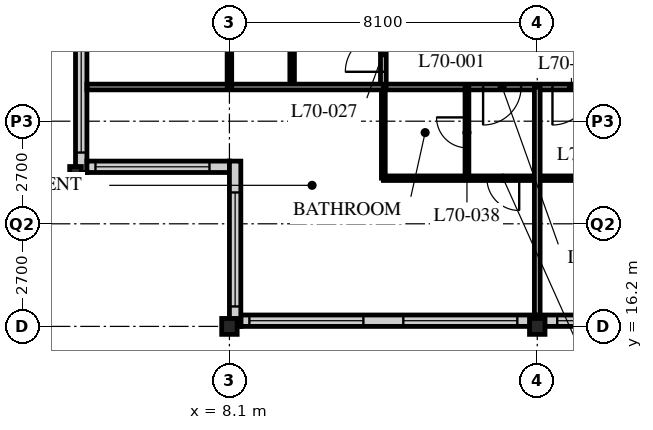
"""IFC4 building model, lengths in metres.
Left out: names, types, materials, properties, quantities, classifications, styles, units other than length and angle.
Written with IfcOpenShell. Run it as: python <this file> out.ifc"""

import sys

from ifc_helpers import new_model, si_unit, direction, frame, frame_2d, origin, origin_2d, place, context, subcontext, project, spatial, rectangle, i_section, extrude, element, fill, save


model = new_model("IFC4")
c1 = context("Model", 3, precision=1e-05, world=origin(), true_north=direction((0.0, 1.0)))
c2 = subcontext(c1, "Body", "Model", "MODEL_VIEW")
j1 = project(units=[si_unit("LENGTHUNIT", "METRE"), si_unit("PLANEANGLEUNIT", "RADIAN")], contexts=[c1])
p1 = place(None, origin())
s1 = spatial("IfcSite", under=j1, at=p1, CompositionType="ELEMENT")
p2 = place(p1, origin())
s2 = spatial("IfcBuilding", under=s1, at=p2, CompositionType="ELEMENT")
p3 = place(p2, frame((0.0, 0.0, 273.6)))
s3 = spatial("IfcBuildingStorey", under=s2, at=p3, CompositionType="ELEMENT", Elevation=273.6)
p4 = place(p3, frame((4.05, 20.25, 0.0), z_axis=(0.0, 0.0, 1.0), x_axis=(1.0, 0.0, 0.0)))
e1 = element("IfcColumn", 1, at=p4, inside=s3, PredefinedType="COLUMN", context=c2, shape_type="SweptSolid", body=[
    extrude(i_section(OverallWidth=0.307, OverallDepth=0.314, WebThickness=0.012, FlangeThickness=0.019, FilletRadius=0.015, at=origin_2d()), origin(), (0.0, 0.0, 1.0), 3.9),
])
for number, where, z_axis, x_axis in (
    (2, (8.1, 16.2, 0.0), (0.0, 0.0, 1.0), (1.0, 0.0, 0.0)),
    (3, (16.2, 16.2, 0.0), (0.0, 0.0, 1.0), (1.0, 0.0, 0.0)),
):
    element("IfcColumn", number, at=place(p3, frame(where, z_axis=z_axis, x_axis=x_axis)), inside=s3, PredefinedType="COLUMN", context=c2, shape_type="SweptSolid", body=[
        extrude(i_section(OverallWidth=0.407, OverallDepth=0.419, WebThickness=0.031, FlangeThickness=0.049, FilletRadius=0.015, at=origin_2d()), origin(), (0.0, 0.0, 1.0), 3.9),
    ])
p5 = place(p3, frame((8.4, 16.35, 0.0), z_axis=(0.0, 0.0, 1.0), x_axis=(1.0, 0.0, 0.0)))
e4 = element("IfcWall", 4, at=p5, inside=s3, PredefinedType="SOLIDWALL", context=c2, shape_type="SweptSolid", body=[
    extrude(rectangle(XDim=40.2, YDim=0.3, at=frame_2d((20.1, 0.0))), origin(), (0.0, 0.0, 1.0), 3.69),
])
p6 = place(p5, frame((0.225, 0.0, 0.6)))
e5 = element("IfcOpeningElement", 5, at=p6, cuts=e4, PredefinedType="OPENING", context=c2, shape_type="SweptSolid", body=[
    extrude(rectangle(XDim=3.0, YDim=2.4, at=frame_2d((1.5, 1.2))), frame((0.0, 0.16, 0.0), z_axis=(0.0, -1.0, 0.0), x_axis=(1.0, 0.0, 0.0)), (0.0, 0.0, 1.0), 0.32),
])
p7 = place(p5, frame((4.275, 0.0, 0.6)))
e6 = element("IfcOpeningElement", 6, at=p7, cuts=e4, PredefinedType="OPENING", context=c2, shape_type="SweptSolid", body=[
    extrude(rectangle(XDim=3.0, YDim=2.4, at=frame_2d((1.5, 1.2))), frame((0.0, 0.16, 0.0), z_axis=(0.0, -1.0, 0.0), x_axis=(1.0, 0.0, 0.0)), (0.0, 0.0, 1.0), 0.32),
])
p8 = place(p5, frame((8.325, 0.0, 0.6)))
e7 = element("IfcOpeningElement", 7, at=p8, cuts=e4, PredefinedType="OPENING", context=c2, shape_type="SweptSolid", body=[
    extrude(rectangle(XDim=3.0, YDim=2.4, at=frame_2d((1.5, 1.2))), frame((0.0, 0.16, 0.0), z_axis=(0.0, -1.0, 0.0), x_axis=(1.0, 0.0, 0.0)), (0.0, 0.0, 1.0), 0.32),
])
p9 = place(p5, frame((12.375, 0.0, 0.6)))
e8 = element("IfcOpeningElement", 8, at=p9, cuts=e4, PredefinedType="OPENING", context=c2, shape_type="SweptSolid", body=[
    extrude(rectangle(XDim=3.0, YDim=2.4, at=frame_2d((1.5, 1.2))), frame((0.0, 0.16, 0.0), z_axis=(0.0, -1.0, 0.0), x_axis=(1.0, 0.0, 0.0)), (0.0, 0.0, 1.0), 0.32),
])
p10 = place(p5, frame((16.425, 0.0, 0.6)))
e9 = element("IfcOpeningElement", 9, at=p10, cuts=e4, PredefinedType="OPENING", context=c2, shape_type="SweptSolid", body=[
    extrude(rectangle(XDim=3.0, YDim=2.4, at=frame_2d((1.5, 1.2))), frame((0.0, 0.16, 0.0), z_axis=(0.0, -1.0, 0.0), x_axis=(1.0, 0.0, 0.0)), (0.0, 0.0, 1.0), 0.32),
])
p11 = place(p5, frame((20.475, 0.0, 0.6)))
e10 = element("IfcOpeningElement", 10, at=p11, cuts=e4, PredefinedType="OPENING", context=c2, shape_type="SweptSolid", body=[
    extrude(rectangle(XDim=3.0, YDim=2.4, at=frame_2d((1.5, 1.2))), frame((0.0, 0.16, 0.0), z_axis=(0.0, -1.0, 0.0), x_axis=(1.0, 0.0, 0.0)), (0.0, 0.0, 1.0), 0.32),
])
p12 = place(p5, frame((24.525, 0.0, 0.6)))
e11 = element("IfcOpeningElement", 11, at=p12, cuts=e4, PredefinedType="OPENING", context=c2, shape_type="SweptSolid", body=[
    extrude(rectangle(XDim=3.0, YDim=2.4, at=frame_2d((1.5, 1.2))), frame((0.0, 0.16, 0.0), z_axis=(0.0, -1.0, 0.0), x_axis=(1.0, 0.0, 0.0)), (0.0, 0.0, 1.0), 0.32),
])
p13 = place(p5, frame((28.575, 0.0, 0.6)))
e12 = element("IfcOpeningElement", 12, at=p13, cuts=e4, PredefinedType="OPENING", context=c2, shape_type="SweptSolid", body=[
    extrude(rectangle(XDim=3.0, YDim=2.4, at=frame_2d((1.5, 1.2))), frame((0.0, 0.16, 0.0), z_axis=(0.0, -1.0, 0.0), x_axis=(1.0, 0.0, 0.0)), (0.0, 0.0, 1.0), 0.32),
])
p14 = place(p5, frame((32.625, 0.0, 0.6)))
e13 = element("IfcOpeningElement", 13, at=p14, cuts=e4, PredefinedType="OPENING", context=c2, shape_type="SweptSolid", body=[
    extrude(rectangle(XDim=3.0, YDim=2.4, at=frame_2d((1.5, 1.2))), frame((0.0, 0.16, 0.0), z_axis=(0.0, -1.0, 0.0), x_axis=(1.0, 0.0, 0.0)), (0.0, 0.0, 1.0), 0.32),
])
p15 = place(p5, frame((36.675, 0.0, 0.6)))
e14 = element("IfcOpeningElement", 14, at=p15, cuts=e4, PredefinedType="OPENING", context=c2, shape_type="SweptSolid", body=[
    extrude(rectangle(XDim=3.0, YDim=2.4, at=frame_2d((1.5, 1.2))), frame((0.0, 0.16, 0.0), z_axis=(0.0, -1.0, 0.0), x_axis=(1.0, 0.0, 0.0)), (0.0, 0.0, 1.0), 0.32),
])
p16 = place(p3, frame((4.2, 24.6, 0.0), z_axis=(0.0, 0.0, 1.0), x_axis=(0.0, -1.0, 0.0)))
e15 = element("IfcWall", 15, at=p16, inside=s3, PredefinedType="SOLIDWALL", context=c2, shape_type="SweptSolid", body=[
    extrude(rectangle(XDim=4.35, YDim=0.3, at=frame_2d((2.175, 0.0))), origin(), (0.0, 0.0, 1.0), 3.69),
])
p17 = place(p16, frame((0.825, 0.0, 0.6)))
e16 = element("IfcOpeningElement", 16, at=p17, cuts=e15, PredefinedType="OPENING", context=c2, shape_type="SweptSolid", body=[
    extrude(rectangle(XDim=3.0, YDim=2.3, at=frame_2d((1.5, 1.15))), frame((0.0, 0.16, 0.0), z_axis=(0.0, -1.0, 0.0), x_axis=(1.0, 0.0, 0.0)), (0.0, 0.0, 1.0), 0.32),
])
p18 = place(p3, frame((4.35, 20.4, 0.0), z_axis=(0.0, 0.0, 1.0), x_axis=(1.0, 0.0, 0.0)))
e17 = element("IfcWall", 17, at=p18, inside=s3, PredefinedType="SOLIDWALL", context=c2, shape_type="SweptSolid", body=[
    extrude(rectangle(XDim=3.75, YDim=0.3, at=frame_2d((1.875, 0.0))), origin(), (0.0, 0.0, 1.0), 3.69),
])
p19 = place(p18, frame((0.225, 0.0, 0.6)))
e18 = element("IfcOpeningElement", 18, at=p19, cuts=e17, PredefinedType="OPENING", context=c2, shape_type="SweptSolid", body=[
    extrude(rectangle(XDim=3.0, YDim=2.3, at=frame_2d((1.5, 1.15))), frame((0.0, 0.16, 0.0), z_axis=(0.0, -1.0, 0.0), x_axis=(1.0, 0.0, 0.0)), (0.0, 0.0, 1.0), 0.32),
])
p20 = place(p3, frame((8.25, 20.55, 0.0), z_axis=(0.0, 0.0, 1.0), x_axis=(0.0, -1.0, 0.0)))
e19 = element("IfcWall", 19, at=p20, inside=s3, PredefinedType="SOLIDWALL", context=c2, shape_type="SweptSolid", body=[
    extrude(rectangle(XDim=4.35, YDim=0.3, at=frame_2d((2.175, 0.0))), origin(), (0.0, 0.0, 1.0), 3.69),
])
p21 = place(p20, frame((0.825, 0.0, 0.6)))
e20 = element("IfcOpeningElement", 20, at=p21, cuts=e19, PredefinedType="OPENING", context=c2, shape_type="SweptSolid", body=[
    extrude(rectangle(XDim=3.0, YDim=2.3, at=frame_2d((1.5, 1.15))), frame((0.0, 0.16, 0.0), z_axis=(0.0, -1.0, 0.0), x_axis=(1.0, 0.0, 0.0)), (0.0, 0.0, 1.0), 0.32),
])
p22 = place(p3, frame((12.15, 22.5, 0.0), z_axis=(0.0, 0.0, 1.0), x_axis=(1.0, 0.0, 0.0)))
e21 = element("IfcWall", 21, at=p22, inside=s3, PredefinedType="PARTITIONING", context=c2, shape_type="SweptSolid", body=[
    extrude(rectangle(XDim=24.3, YDim=0.15, at=frame_2d((12.15, 0.0))), origin(), (0.0, 0.0, 1.0), 3.69),
])
p23 = place(p22, frame((4.45, 0.0, 0.0)))
e22 = element("IfcOpeningElement", 22, at=p23, cuts=e21, PredefinedType="OPENING", context=c2, shape_type="SweptSolid", body=[
    extrude(rectangle(XDim=1.0, YDim=2.1, at=frame_2d((0.5, 1.05))), frame((0.0, 0.085, 0.0), z_axis=(0.0, -1.0, 0.0), x_axis=(1.0, 0.0, 0.0)), (0.0, 0.0, 1.0), 0.17),
])
p24 = place(p22, frame((12.55, 0.0, 0.0)))
e23 = element("IfcOpeningElement", 23, at=p24, cuts=e21, PredefinedType="OPENING", context=c2, shape_type="SweptSolid", body=[
    extrude(rectangle(XDim=1.0, YDim=2.1, at=frame_2d((0.5, 1.05))), frame((0.0, 0.085, 0.0), z_axis=(0.0, -1.0, 0.0), x_axis=(1.0, 0.0, 0.0)), (0.0, 0.0, 1.0), 0.17),
])
p25 = place(p22, frame((2.625, 0.0, 0.0)))
e24 = element("IfcOpeningElement", 24, at=p25, cuts=e21, PredefinedType="OPENING", context=c2, shape_type="SweptSolid", body=[
    extrude(rectangle(XDim=1.0, YDim=2.1, at=frame_2d((0.5, 1.05))), frame((0.0, 0.085, 0.0), z_axis=(0.0, -1.0, 0.0), x_axis=(1.0, 0.0, 0.0)), (0.0, 0.0, 1.0), 0.17),
])
p26 = place(p3, frame((12.15, 22.5, 0.0), z_axis=(0.0, 0.0, 1.0), x_axis=(0.0, 1.0, 0.0)))
e25 = element("IfcWall", 25, at=p26, inside=s3, PredefinedType="PARTITIONING", context=c2, shape_type="SweptSolid", body=[
    extrude(rectangle(XDim=30.15, YDim=0.15, at=frame_2d((15.075, 0.0))), origin(), (0.0, 0.0, 1.0), 3.69),
])
p27 = place(p26, frame((0.4, 0.0, 0.0)))
e26 = element("IfcOpeningElement", 26, at=p27, cuts=e25, PredefinedType="OPENING", context=c2, shape_type="SweptSolid", body=[
    extrude(rectangle(XDim=1.0, YDim=2.1, at=frame_2d((0.5, 1.05))), frame((0.0, 0.085, 0.0), z_axis=(0.0, -1.0, 0.0), x_axis=(1.0, 0.0, 0.0)), (0.0, 0.0, 1.0), 0.17),
])
p28 = place(p26, frame((18.4, 0.0, 0.0)))
e27 = element("IfcOpeningElement", 27, at=p28, cuts=e25, PredefinedType="OPENING", context=c2, shape_type="SweptSolid", body=[
    extrude(rectangle(XDim=1.0, YDim=2.1, at=frame_2d((0.5, 1.05))), frame((0.0, 0.085, 0.0), z_axis=(0.0, -1.0, 0.0), x_axis=(1.0, 0.0, 0.0)), (0.0, 0.0, 1.0), 0.17),
])
p29 = place(p26, frame((28.45, 0.0, 0.0)))
e28 = element("IfcOpeningElement", 28, at=p29, cuts=e25, PredefinedType="OPENING", context=c2, shape_type="SweptSolid", body=[
    extrude(rectangle(XDim=1.0, YDim=2.1, at=frame_2d((0.5, 1.05))), frame((0.0, 0.085, 0.0), z_axis=(0.0, -1.0, 0.0), x_axis=(1.0, 0.0, 0.0)), (0.0, 0.0, 1.0), 0.17),
])
p30 = place(p3, frame((9.75, 22.5, 0.0), z_axis=(0.0, 0.0, 1.0), x_axis=(0.0, 1.0, 0.0)))
e29 = element("IfcWall", 29, at=p30, inside=s3, PredefinedType="PARTITIONING", context=c2, shape_type="SweptSolid", body=[
    extrude(rectangle(XDim=26.1, YDim=0.12, at=frame_2d((13.05, 0.0))), origin(), (0.0, 0.0, 1.0), 3.69),
])
p31 = place(p30, frame((0.975, 0.0, 0.0)))
e30 = element("IfcOpeningElement", 30, at=p31, cuts=e29, PredefinedType="OPENING", context=c2, shape_type="SweptSolid", body=[
    extrude(rectangle(XDim=0.85, YDim=2.1, at=frame_2d((0.425, 1.05))), frame((0.0, 0.07, 0.0), z_axis=(0.0, -1.0, 0.0), x_axis=(1.0, 0.0, 0.0)), (0.0, 0.0, 1.0), 0.14),
])
p32 = place(p30, frame((10.225, 0.0, 0.0)))
e31 = element("IfcOpeningElement", 31, at=p32, cuts=e29, PredefinedType="OPENING", context=c2, shape_type="SweptSolid", body=[
    extrude(rectangle(XDim=0.85, YDim=2.1, at=frame_2d((0.425, 1.05))), frame((0.0, 0.07, 0.0), z_axis=(0.0, -1.0, 0.0), x_axis=(1.0, 0.0, 0.0)), (0.0, 0.0, 1.0), 0.14),
])
p33 = place(p30, frame((14.275, 0.0, 0.0)))
e32 = element("IfcOpeningElement", 32, at=p33, cuts=e29, PredefinedType="OPENING", context=c2, shape_type="SweptSolid", body=[
    extrude(rectangle(XDim=0.85, YDim=2.1, at=frame_2d((0.425, 1.05))), frame((0.0, 0.07, 0.0), z_axis=(0.0, -1.0, 0.0), x_axis=(1.0, 0.0, 0.0)), (0.0, 0.0, 1.0), 0.14),
])
p34 = place(p30, frame((18.975, 0.0, 0.0)))
e33 = element("IfcOpeningElement", 33, at=p34, cuts=e29, PredefinedType="OPENING", context=c2, shape_type="SweptSolid", body=[
    extrude(rectangle(XDim=0.85, YDim=2.1, at=frame_2d((0.425, 1.05))), frame((0.0, 0.07, 0.0), z_axis=(0.0, -1.0, 0.0), x_axis=(1.0, 0.0, 0.0)), (0.0, 0.0, 1.0), 0.14),
])
p35 = place(p30, frame((22.375, 0.0, 0.0)))
e34 = element("IfcOpeningElement", 34, at=p35, cuts=e29, PredefinedType="OPENING", context=c2, shape_type="SweptSolid", body=[
    extrude(rectangle(XDim=0.85, YDim=2.1, at=frame_2d((0.425, 1.05))), frame((0.0, 0.07, 0.0), z_axis=(0.0, -1.0, 0.0), x_axis=(1.0, 0.0, 0.0)), (0.0, 0.0, 1.0), 0.14),
])
p36 = place(p3, frame((12.15, 20.1, 0.0), z_axis=(0.0, 0.0, 1.0), x_axis=(1.0, 0.0, 0.0)))
e35 = element("IfcWall", 35, at=p36, inside=s3, PredefinedType="PARTITIONING", context=c2, shape_type="SweptSolid", body=[
    extrude(rectangle(XDim=24.3, YDim=0.12, at=frame_2d((12.15, 0.0))), origin(), (0.0, 0.0, 1.0), 3.69),
])
p37 = place(p36, frame((5.025, 0.0, 0.0)))
e36 = element("IfcOpeningElement", 36, at=p37, cuts=e35, PredefinedType="OPENING", context=c2, shape_type="SweptSolid", body=[
    extrude(rectangle(XDim=0.85, YDim=2.1, at=frame_2d((0.425, 1.05))), frame((0.0, 0.07, 0.0), z_axis=(0.0, -1.0, 0.0), x_axis=(1.0, 0.0, 0.0)), (0.0, 0.0, 1.0), 0.14),
])
p38 = place(p36, frame((8.425, 0.0, 0.0)))
e37 = element("IfcOpeningElement", 37, at=p38, cuts=e35, PredefinedType="OPENING", context=c2, shape_type="SweptSolid", body=[
    extrude(rectangle(XDim=0.85, YDim=2.1, at=frame_2d((0.425, 1.05))), frame((0.0, 0.07, 0.0), z_axis=(0.0, -1.0, 0.0), x_axis=(1.0, 0.0, 0.0)), (0.0, 0.0, 1.0), 0.14),
])
p39 = place(p36, frame((13.125, 0.0, 0.0)))
e38 = element("IfcOpeningElement", 38, at=p39, cuts=e35, PredefinedType="OPENING", context=c2, shape_type="SweptSolid", body=[
    extrude(rectangle(XDim=0.85, YDim=2.1, at=frame_2d((0.425, 1.05))), frame((0.0, 0.07, 0.0), z_axis=(0.0, -1.0, 0.0), x_axis=(1.0, 0.0, 0.0)), (0.0, 0.0, 1.0), 0.14),
])
p40 = place(p36, frame((20.575, 0.0, 0.0)))
e39 = element("IfcOpeningElement", 39, at=p40, cuts=e35, PredefinedType="OPENING", context=c2, shape_type="SweptSolid", body=[
    extrude(rectangle(XDim=0.85, YDim=2.1, at=frame_2d((0.425, 1.05))), frame((0.0, 0.07, 0.0), z_axis=(0.0, -1.0, 0.0), x_axis=(1.0, 0.0, 0.0)), (0.0, 0.0, 1.0), 0.14),
])
p41 = place(p36, frame((2.725, 0.0, 0.0)))
e40 = element("IfcOpeningElement", 40, at=p41, cuts=e35, PredefinedType="OPENING", context=c2, shape_type="SweptSolid", body=[
    extrude(rectangle(XDim=0.85, YDim=2.1, at=frame_2d((0.425, 1.05))), frame((0.0, 0.07, 0.0), z_axis=(0.0, -1.0, 0.0), x_axis=(1.0, 0.0, 0.0)), (0.0, 0.0, 1.0), 0.14),
])
p42 = place(p3, frame((14.35, 22.5, 0.0), z_axis=(0.0, 0.0, 1.0), x_axis=(0.0, -1.0, 0.0)))
e41 = element("IfcWall", 41, at=p42, inside=s3, PredefinedType="PARTITIONING", context=c2, shape_type="SweptSolid", body=[
    extrude(rectangle(XDim=2.4, YDim=0.1, at=frame_2d((1.2, 0.0))), origin(), (0.0, 0.0, 1.0), 3.69),
])
p43 = place(p42, frame((0.8, 0.0, 0.0)))
e42 = element("IfcOpeningElement", 42, at=p43, cuts=e41, PredefinedType="OPENING", context=c2, shape_type="SweptSolid", body=[
    extrude(rectangle(XDim=0.8, YDim=2.1, at=frame_2d((0.4, 1.05))), frame((0.0, 0.06, 0.0), z_axis=(0.0, -1.0, 0.0), x_axis=(1.0, 0.0, 0.0)), (0.0, 0.0, 1.0), 0.12),
])
p44 = place(p3, frame((12.15, 22.5, 0.0), z_axis=(0.0, 0.0, 1.0), x_axis=(0.0, -1.0, 0.0)))
e43 = element("IfcWall", 43, at=p44, inside=s3, PredefinedType="PARTITIONING", context=c2, shape_type="SweptSolid", body=[
    extrude(rectangle(XDim=2.4, YDim=0.1, at=frame_2d((1.2, 0.0))), origin(), (0.0, 0.0, 1.0), 3.69),
])
p45 = place(p3, frame((4.35, 22.5, 0.0), z_axis=(0.0, 0.0, 1.0), x_axis=(1.0, 0.0, 0.0)))
e44 = element("IfcWall", 44, at=p45, inside=s3, PredefinedType="PARTITIONING", context=c2, shape_type="SweptSolid", body=[
    extrude(rectangle(XDim=7.8, YDim=0.15, at=frame_2d((3.9, 0.0))), origin(), (0.0, 0.0, 1.0), 3.69),
])
p46 = place(p3, frame((16.2, 22.5, 0.0), z_axis=(0.0, 0.0, 1.0), x_axis=(0.0, -1.0, 0.0)))
e45 = element("IfcWall", 45, at=p46, inside=s3, PredefinedType="PARTITIONING", context=c2, shape_type="SweptSolid", body=[
    extrude(rectangle(XDim=6.0, YDim=0.15, at=frame_2d((3.0, 0.0))), origin(), (0.0, 0.0, 1.0), 3.078),
])
p47 = place(p3, frame((8.1, 22.5, 0.0), z_axis=(0.0, 0.0, 1.0), x_axis=(0.0, 1.0, 0.0)))
e46 = element("IfcWall", 46, at=p47, inside=s3, PredefinedType="PARTITIONING", context=c2, shape_type="SweptSolid", body=[
    extrude(rectangle(XDim=1.597, YDim=0.12, at=frame_2d((0.798, 0.0))), origin(), (0.0, 0.0, 1.0), 3.078),
])
p48 = place(p6, origin())
e47 = element("IfcWindow", 47, at=p48, inside=s3, PartitioningType="SINGLE_PANEL", PredefinedType="WINDOW", context=c2, shape_type="SweptSolid", body=[
    extrude(rectangle(XDim=3.0, YDim=2.4, at=frame_2d((1.5, 1.2))), frame((0.0, 0.03, 0.0), z_axis=(0.0, -1.0, 0.0), x_axis=(1.0, 0.0, 0.0)), (0.0, 0.0, 1.0), 0.06),
])
fill(e5, e47)
p49 = place(p7, origin())
e48 = element("IfcWindow", 48, at=p49, inside=s3, PartitioningType="SINGLE_PANEL", PredefinedType="WINDOW", context=c2, shape_type="SweptSolid", body=[
    extrude(rectangle(XDim=3.0, YDim=2.4, at=frame_2d((1.5, 1.2))), frame((0.0, 0.03, 0.0), z_axis=(0.0, -1.0, 0.0), x_axis=(1.0, 0.0, 0.0)), (0.0, 0.0, 1.0), 0.06),
])
fill(e6, e48)
p50 = place(p8, origin())
e49 = element("IfcWindow", 49, at=p50, inside=s3, PartitioningType="SINGLE_PANEL", PredefinedType="WINDOW", context=c2, shape_type="SweptSolid", body=[
    extrude(rectangle(XDim=3.0, YDim=2.4, at=frame_2d((1.5, 1.2))), frame((0.0, 0.03, 0.0), z_axis=(0.0, -1.0, 0.0), x_axis=(1.0, 0.0, 0.0)), (0.0, 0.0, 1.0), 0.06),
])
fill(e7, e49)
p51 = place(p17, origin())
e50 = element("IfcWindow", 50, at=p51, inside=s3, PartitioningType="SINGLE_PANEL", PredefinedType="WINDOW", context=c2, shape_type="SweptSolid", body=[
    extrude(rectangle(XDim=3.0, YDim=2.3, at=frame_2d((1.5, 1.15))), frame((0.0, 0.03, 0.0), z_axis=(0.0, -1.0, 0.0), x_axis=(1.0, 0.0, 0.0)), (0.0, 0.0, 1.0), 0.06),
])
fill(e16, e50)
p52 = place(p19, origin())
e51 = element("IfcWindow", 51, at=p52, inside=s3, PartitioningType="SINGLE_PANEL", PredefinedType="WINDOW", context=c2, shape_type="SweptSolid", body=[
    extrude(rectangle(XDim=3.0, YDim=2.3, at=frame_2d((1.5, 1.15))), frame((0.0, 0.03, 0.0), z_axis=(0.0, -1.0, 0.0), x_axis=(1.0, 0.0, 0.0)), (0.0, 0.0, 1.0), 0.06),
])
fill(e18, e51)
p53 = place(p21, origin())
e52 = element("IfcWindow", 52, at=p53, inside=s3, PartitioningType="SINGLE_PANEL", PredefinedType="WINDOW", context=c2, shape_type="SweptSolid", body=[
    extrude(rectangle(XDim=3.0, YDim=2.3, at=frame_2d((1.5, 1.15))), frame((0.0, 0.03, 0.0), z_axis=(0.0, -1.0, 0.0), x_axis=(1.0, 0.0, 0.0)), (0.0, 0.0, 1.0), 0.06),
])
fill(e20, e52)
p54 = place(p23, origin())
e53 = element("IfcDoor", 53, at=p54, inside=s3, OperationType="SINGLE_SWING_RIGHT", PredefinedType="DOOR", context=c2, shape_type="SweptSolid", body=[
    extrude(rectangle(XDim=1.0, YDim=2.1, at=frame_2d((0.5, 1.05))), frame((0.0, 0.025, 0.0), z_axis=(0.0, -1.0, 0.0), x_axis=(1.0, 0.0, 0.0)), (0.0, 0.0, 1.0), 0.05),
])
fill(e22, e53)
p55 = place(p27, origin())
e54 = element("IfcDoor", 54, at=p55, inside=s3, OperationType="SINGLE_SWING_LEFT", PredefinedType="DOOR", context=c2, shape_type="SweptSolid", body=[
    extrude(rectangle(XDim=1.0, YDim=2.1, at=frame_2d((0.5, 1.05))), frame((0.0, 0.025, 0.0), z_axis=(0.0, -1.0, 0.0), x_axis=(1.0, 0.0, 0.0)), (0.0, 0.0, 1.0), 0.05),
])
fill(e26, e54)
p56 = place(p43, origin())
e55 = element("IfcDoor", 55, at=p56, inside=s3, OperationType="SINGLE_SWING_RIGHT", PredefinedType="DOOR", context=c2, shape_type="SweptSolid", body=[
    extrude(rectangle(XDim=0.8, YDim=2.1, at=frame_2d((0.4, 1.05))), frame((0.0, 0.025, 0.0), z_axis=(0.0, -1.0, 0.0), x_axis=(1.0, 0.0, 0.0)), (0.0, 0.0, 1.0), 0.05),
])
fill(e42, e55)
p57 = place(p25, origin())
e56 = element("IfcDoor", 56, at=p57, inside=s3, OperationType="SINGLE_SWING_RIGHT", PredefinedType="DOOR", context=c2, shape_type="SweptSolid", body=[
    extrude(rectangle(XDim=1.0, YDim=2.1, at=frame_2d((0.5, 1.05))), frame((0.0, 0.025, 0.0), z_axis=(0.0, -1.0, 0.0), x_axis=(1.0, 0.0, 0.0)), (0.0, 0.0, 1.0), 0.05),
])
fill(e24, e56)
p58 = place(p41, origin())
e57 = element("IfcDoor", 57, at=p58, inside=s3, OperationType="SINGLE_SWING_LEFT", PredefinedType="DOOR", context=c2, shape_type="SweptSolid", body=[
    extrude(rectangle(XDim=0.85, YDim=2.1, at=frame_2d((0.425, 1.05))), frame((0.0, 0.025, 0.0), z_axis=(0.0, -1.0, 0.0), x_axis=(1.0, 0.0, 0.0)), (0.0, 0.0, 1.0), 0.05),
])
fill(e40, e57)
save(model, sys.argv[1])
